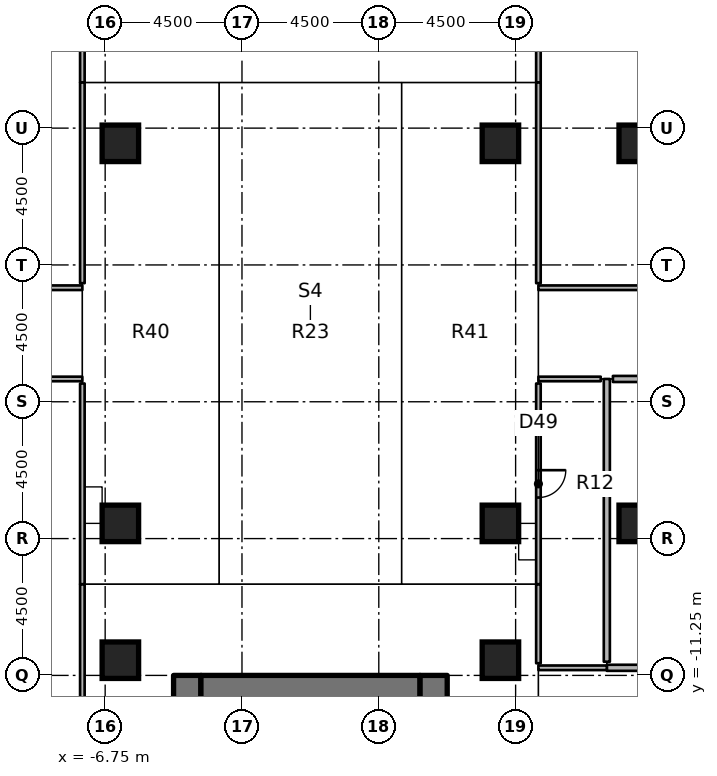
"""IFC4 building model, lengths in metres.
Left out: names, types, materials, properties, quantities, classifications, styles, units other than length and angle.
Written with IfcOpenShell. Run it as: python <this file> out.ifc"""

import sys

from ifc_helpers import new_model, si_unit, direction, frame, frame_2d, origin, origin_2d, place, context, subcontext, project, spatial, rectangle, extrude, element, fill, save


model = new_model("IFC4")
c1 = context("Model", 3, precision=1e-05, world=origin(), true_north=direction((0.0, 1.0)))
c2 = subcontext(c1, "Body", "Model", "MODEL_VIEW")
j1 = project(units=[si_unit("LENGTHUNIT", "METRE"), si_unit("PLANEANGLEUNIT", "RADIAN")], contexts=[c1])
p1 = place(None, origin())
s1 = spatial("IfcSite", under=j1, at=p1, CompositionType="ELEMENT")
p2 = place(p1, origin())
s2 = spatial("IfcBuilding", under=s1, at=p2, CompositionType="ELEMENT")
p3 = place(p2, frame((0.0, 0.0, 7.0)))
s3 = spatial("IfcBuildingStorey", under=s2, at=p3, CompositionType="ELEMENT", Elevation=7.0)
for number, where, z_axis, x_axis in (
    (1, (-6.25, -10.75, 0.0), (0.0, 0.0, 1.0), (1.0, 0.0, 0.0)),
    (2, (-6.25, -6.25, 0.0), (0.0, 0.0, 1.0), (1.0, 0.0, 0.0)),
    (3, (-6.25, 6.25, 0.0), (0.0, 0.0, 1.0), (1.0, 0.0, 0.0)),
    (4, (6.25, -10.75, 0.0), (0.0, 0.0, 1.0), (1.0, 0.0, 0.0)),
    (5, (6.25, -6.25, 0.0), (0.0, 0.0, 1.0), (1.0, 0.0, 0.0)),
    (6, (6.25, 6.25, 0.0), (0.0, 0.0, 1.0), (1.0, 0.0, 0.0)),
    (7, (10.75, -6.25, 0.0), (0.0, 0.0, 1.0), (1.0, 0.0, 0.0)),
    (8, (10.75, 6.25, 0.0), (0.0, 0.0, 1.0), (1.0, 0.0, 0.0)),
):
    element("IfcColumn", number, at=place(p3, frame(where, z_axis=z_axis, x_axis=x_axis)), inside=s3, PredefinedType="COLUMN", context=c2, shape_type="SweptSolid", body=[
        extrude(rectangle(XDim=1.2, YDim=1.2, at=origin_2d()), origin(), (0.0, 0.0, 1.0), 4.55),
    ])
p4 = place(p3, frame((-4.05, -11.25, 0.0), z_axis=(0.0, 0.0, 1.0), x_axis=(0.0, -1.0, 0.0)))
e9 = element("IfcWall", 9, at=p4, inside=s3, PredefinedType="SHEAR", context=c2, shape_type="SweptSolid", body=[
    extrude(rectangle(XDim=15.0, YDim=0.9, at=frame_2d((7.5, 0.0))), origin(), (0.0, 0.0, 1.0), 5.0),
])
p5 = place(p4, frame((7.15, 0.0, 0.0)))
e10 = element("IfcOpeningElement", 10, at=p5, cuts=e9, PredefinedType="OPENING", context=c2, shape_type="SweptSolid", body=[
    extrude(rectangle(XDim=1.5, YDim=2.3, at=frame_2d((0.75, 1.15))), frame((0.0, 0.46, 0.0), z_axis=(0.0, -1.0, 0.0), x_axis=(1.0, 0.0, 0.0)), (0.0, 0.0, 1.0), 0.92),
])
p6 = place(p4, frame((5.55, 0.0, 0.0)))
e11 = element("IfcOpeningElement", 11, at=p6, cuts=e9, PredefinedType="OPENING", context=c2, shape_type="SweptSolid", body=[
    extrude(rectangle(XDim=1.2, YDim=2.1, at=frame_2d((0.6, 1.05))), frame((0.0, 0.46, 0.0), z_axis=(0.0, -1.0, 0.0), x_axis=(1.0, 0.0, 0.0)), (0.0, 0.0, 1.0), 0.92),
])
p7 = place(p3, frame((4.05, -11.25, 0.0), z_axis=(0.0, 0.0, 1.0), x_axis=(0.0, -1.0, 0.0)))
e12 = element("IfcWall", 12, at=p7, inside=s3, PredefinedType="SHEAR", context=c2, shape_type="SweptSolid", body=[
    extrude(rectangle(XDim=15.0, YDim=0.9, at=frame_2d((7.5, 0.0))), origin(), (0.0, 0.0, 1.0), 5.0),
])
p8 = place(p7, frame((7.15, 0.0, 0.0)))
e13 = element("IfcOpeningElement", 13, at=p8, cuts=e12, PredefinedType="OPENING", context=c2, shape_type="SweptSolid", body=[
    extrude(rectangle(XDim=1.5, YDim=2.3, at=frame_2d((0.75, 1.15))), frame((0.0, 0.46, 0.0), z_axis=(0.0, -1.0, 0.0), x_axis=(1.0, 0.0, 0.0)), (0.0, 0.0, 1.0), 0.92),
])
p9 = place(p7, frame((13.9, 0.0, 0.0)))
e14 = element("IfcOpeningElement", 14, at=p9, cuts=e12, PredefinedType="OPENING", context=c2, shape_type="SweptSolid", body=[
    extrude(rectangle(XDim=0.9, YDim=2.1, at=frame_2d((0.45, 1.05))), frame((0.0, 0.46, 0.0), z_axis=(0.0, -1.0, 0.0), x_axis=(1.0, 0.0, 0.0)), (0.0, 0.0, 1.0), 0.92),
])
p10 = place(p7, frame((1.15, 0.0, 0.0)))
e15 = element("IfcOpeningElement", 15, at=p10, cuts=e12, PredefinedType="OPENING", context=c2, shape_type="SweptSolid", body=[
    extrude(rectangle(XDim=1.2, YDim=2.1, at=frame_2d((0.6, 1.05))), frame((0.0, 0.46, 0.0), z_axis=(0.0, -1.0, 0.0), x_axis=(1.0, 0.0, 0.0)), (0.0, 0.0, 1.0), 0.92),
])
p11 = place(p3, frame((-3.6, -11.7, 0.0), z_axis=(0.0, 0.0, 1.0), x_axis=(1.0, 0.0, 0.0)))
e16 = element("IfcWall", 16, at=p11, inside=s3, PredefinedType="SHEAR", context=c2, shape_type="SweptSolid", body=[
    extrude(rectangle(XDim=7.2, YDim=0.9, at=frame_2d((3.6, 0.0))), origin(), (0.0, 0.0, 1.0), 5.0),
])
p12 = place(p3, frame((9.75, -11.0, 0.0), z_axis=(0.0, 0.0, 1.0), x_axis=(1.0, 0.0, 0.0)))
e17 = element("IfcWall", 17, at=p12, inside=s3, PredefinedType="PARTITIONING", context=c2, shape_type="SweptSolid", body=[
    extrude(rectangle(XDim=4.8, YDim=0.2, at=frame_2d((2.4, 0.0))), origin(), (0.0, 0.0, 1.0), 4.55),
])
p13 = place(p3, frame((7.5, -11.0, 0.0), z_axis=(0.0, 0.0, 1.0), x_axis=(1.0, 0.0, 0.0)))
e18 = element("IfcWall", 18, at=p13, inside=s3, PredefinedType="PARTITIONING", context=c2, shape_type="SweptSolid", body=[
    extrude(rectangle(XDim=2.25, YDim=0.15, at=frame_2d((1.125, 0.0))), origin(), (0.0, 0.0, 1.0), 4.55),
])
p14 = place(p3, frame((9.75, -10.8, 0.0), z_axis=(0.0, 0.0, 1.0), x_axis=(0.0, 1.0, 0.0)))
e19 = element("IfcWall", 19, at=p14, inside=s3, PredefinedType="PARTITIONING", context=c2, shape_type="SweptSolid", body=[
    extrude(rectangle(XDim=9.3, YDim=0.2, at=frame_2d((4.65, 0.0))), origin(), (0.0, 0.0, 1.0), 4.55),
])
p15 = place(p3, frame((33.75, -1.5, 0.0), z_axis=(0.0, 0.0, 1.0), x_axis=(-1.0, 0.0, 0.0)))
e20 = element("IfcWall", 20, at=p15, inside=s3, PredefinedType="PARTITIONING", context=c2, shape_type="SweptSolid", body=[
    extrude(rectangle(XDim=23.8, YDim=0.2, at=frame_2d((11.9, 0.0))), origin(), (0.0, 0.0, 1.0), 4.55),
])
p16 = place(p15, frame((11.45, 0.0, 0.0)))
e21 = element("IfcOpeningElement", 21, at=p16, cuts=e20, PredefinedType="OPENING", context=c2, shape_type="SweptSolid", body=[
    extrude(rectangle(XDim=0.9, YDim=2.1, at=frame_2d((0.45, 1.05))), frame((0.0, 0.11, 0.0), z_axis=(0.0, -1.0, 0.0), x_axis=(1.0, 0.0, 0.0)), (0.0, 0.0, 1.0), 0.22),
])
p17 = place(p3, frame((7.5, -10.85, 0.0), z_axis=(0.0, 0.0, 1.0), x_axis=(0.0, 1.0, 0.0)))
e22 = element("IfcWall", 22, at=p17, inside=s3, PredefinedType="PARTITIONING", context=c2, shape_type="SweptSolid", body=[
    extrude(rectangle(XDim=2.6, YDim=0.15, at=frame_2d((1.3, 0.0))), origin(), (0.0, 0.0, 1.0), 4.55),
])
p18 = place(p3, frame((7.5, -1.5, 0.0), z_axis=(0.0, 0.0, 1.0), x_axis=(1.0, 0.0, 0.0)))
e23 = element("IfcWall", 23, at=p18, inside=s3, PredefinedType="PARTITIONING", context=c2, shape_type="SweptSolid", body=[
    extrude(rectangle(XDim=2.05, YDim=0.15, at=frame_2d((1.025, 0.0))), origin(), (0.0, 0.0, 1.0), 4.55),
])
p19 = place(p3, frame((7.5, -1.65, 0.0), z_axis=(0.0, 0.0, 1.0), x_axis=(0.0, -1.0, 0.0)))
e24 = element("IfcWall", 24, at=p19, inside=s3, PredefinedType="PARTITIONING", context=c2, shape_type="SweptSolid", body=[
    extrude(rectangle(XDim=6.6, YDim=0.15, at=frame_2d((3.3, 0.0))), origin(), (0.0, 0.0, 1.0), 4.55),
])
p20 = place(p19, frame((2.85, 0.0, 0.0)))
e25 = element("IfcOpeningElement", 25, at=p20, cuts=e24, PredefinedType="OPENING", context=c2, shape_type="SweptSolid", body=[
    extrude(rectangle(XDim=0.9, YDim=2.1, at=frame_2d((0.45, 1.05))), frame((0.0, 0.085, 0.0), z_axis=(0.0, -1.0, 0.0), x_axis=(1.0, 0.0, 0.0)), (0.0, 0.0, 1.0), 0.17),
])
p21 = place(p3, frame((7.5, 30.0, 0.0), z_axis=(0.0, 0.0, 1.0), x_axis=(0.0, -1.0, 0.0)))
e26 = element("IfcWall", 26, at=p21, inside=s3, PredefinedType="PARTITIONING", context=c2, shape_type="SweptSolid", body=[
    extrude(rectangle(XDim=21.75, YDim=0.15, at=frame_2d((10.875, 0.0))), origin(), (0.0, 0.0, 1.0), 4.55),
])
p22 = place(p21, frame((6.75, 0.0, 0.0)))
e27 = element("IfcOpeningElement", 27, at=p22, cuts=e26, PredefinedType="OPENING", context=c2, shape_type="SweptSolid", body=[
    extrude(rectangle(XDim=1.0, YDim=2.1, at=frame_2d((0.5, 1.05))), frame((0.0, 0.085, 0.0), z_axis=(0.0, -1.0, 0.0), x_axis=(1.0, 0.0, 0.0)), (0.0, 0.0, 1.0), 0.17),
])
p23 = place(p3, frame((-7.5, 8.25, 0.0), z_axis=(0.0, 0.0, 1.0), x_axis=(0.0, 1.0, 0.0)))
e28 = element("IfcWall", 28, at=p23, inside=s3, PredefinedType="PARTITIONING", context=c2, shape_type="SweptSolid", body=[
    extrude(rectangle(XDim=21.75, YDim=0.15, at=frame_2d((10.875, 0.0))), origin(), (0.0, 0.0, 1.0), 4.55),
])
p24 = place(p23, frame((5.75, 0.0, 0.0)))
e29 = element("IfcOpeningElement", 29, at=p24, cuts=e28, PredefinedType="OPENING", context=c2, shape_type="SweptSolid", body=[
    extrude(rectangle(XDim=1.0, YDim=2.1, at=frame_2d((0.5, 1.05))), frame((0.0, 0.085, 0.0), z_axis=(0.0, -1.0, 0.0), x_axis=(1.0, 0.0, 0.0)), (0.0, 0.0, 1.0), 0.17),
])
p25 = place(p3, frame((-7.5, -32.25, 0.0), z_axis=(0.0, 0.0, 1.0), x_axis=(0.0, 1.0, 0.0)))
e30 = element("IfcWall", 30, at=p25, inside=s3, PredefinedType="PARTITIONING", context=c2, shape_type="SweptSolid", body=[
    extrude(rectangle(XDim=24.0, YDim=0.15, at=frame_2d((12.0, 0.0))), origin(), (0.0, 0.0, 1.0), 4.55),
])
p26 = place(p25, frame((12.75, 0.0, 0.0)))
e31 = element("IfcOpeningElement", 31, at=p26, cuts=e30, PredefinedType="OPENING", context=c2, shape_type="SweptSolid", body=[
    extrude(rectangle(XDim=0.9, YDim=2.1, at=frame_2d((0.45, 1.05))), frame((0.0, 0.085, 0.0), z_axis=(0.0, -1.0, 0.0), x_axis=(1.0, 0.0, 0.0)), (0.0, 0.0, 1.0), 0.17),
])
p27 = place(p3, frame((7.5, 1.5, 0.0), z_axis=(0.0, 0.0, 1.0), x_axis=(1.0, 0.0, 0.0)))
e32 = element("IfcWall", 32, at=p27, inside=s3, PredefinedType="PARTITIONING", context=c2, shape_type="SweptSolid", body=[
    extrude(rectangle(XDim=21.75, YDim=0.15, at=frame_2d((10.875, 0.0))), origin(), (0.0, 0.0, 1.0), 4.55),
])
p28 = place(p27, frame((14.0, 0.0, 0.0)))
e33 = element("IfcOpeningElement", 33, at=p28, cuts=e32, PredefinedType="OPENING", context=c2, shape_type="SweptSolid", body=[
    extrude(rectangle(XDim=1.0, YDim=2.1, at=frame_2d((0.5, 1.05))), frame((0.0, 0.085, 0.0), z_axis=(0.0, -1.0, 0.0), x_axis=(1.0, 0.0, 0.0)), (0.0, 0.0, 1.0), 0.17),
])
p29 = place(p3, frame((-24.75, 1.5, 0.0), z_axis=(0.0, 0.0, 1.0), x_axis=(1.0, 0.0, 0.0)))
e34 = element("IfcWall", 34, at=p29, inside=s3, PredefinedType="PARTITIONING", context=c2, shape_type="SweptSolid", body=[
    extrude(rectangle(XDim=17.25, YDim=0.15, at=frame_2d((8.625, 0.0))), origin(), (0.0, 0.0, 1.0), 4.55),
])
p30 = place(p29, frame((11.0, 0.0, 0.0)))
e35 = element("IfcOpeningElement", 35, at=p30, cuts=e34, PredefinedType="OPENING", context=c2, shape_type="SweptSolid", body=[
    extrude(rectangle(XDim=1.0, YDim=2.1, at=frame_2d((0.5, 1.05))), frame((0.0, 0.085, 0.0), z_axis=(0.0, -1.0, 0.0), x_axis=(1.0, 0.0, 0.0)), (0.0, 0.0, 1.0), 0.17),
])
p31 = place(p3, frame((-7.5, -1.5, 0.0), z_axis=(0.0, 0.0, 1.0), x_axis=(-1.0, 0.0, 0.0)))
e36 = element("IfcWall", 36, at=p31, inside=s3, PredefinedType="PARTITIONING", context=c2, shape_type="SweptSolid", body=[
    extrude(rectangle(XDim=19.5, YDim=0.15, at=frame_2d((9.75, 0.0))), origin(), (0.0, 0.0, 1.0), 4.55),
])
for number, where, z_axis, x_axis in (
    (37, (7.5, 1.65, 0.0), (0.0, 0.0, 1.0), (0.0, 1.0, 0.0)),
    (38, (-7.5, 8.25, 0.0), (0.0, 0.0, 1.0), (0.0, -1.0, 0.0)),
    (39, (-7.5, -1.65, 0.0), (0.0, 0.0, 1.0), (0.0, -1.0, 0.0)),
):
    element("IfcWall", number, at=place(p3, frame(where, z_axis=z_axis, x_axis=x_axis)), inside=s3, PredefinedType="PARTITIONING", context=c2, shape_type="SweptSolid", body=[
        extrude(rectangle(XDim=6.6, YDim=0.15, at=frame_2d((3.3, 0.0))), origin(), (0.0, 0.0, 1.0), 4.55),
    ])
p32 = place(p20, origin())
e40 = element("IfcDoor", 40, at=p32, inside=s3, OperationType="SINGLE_SWING_LEFT", PredefinedType="DOOR", context=c2, shape_type="SweptSolid", body=[
    extrude(rectangle(XDim=0.9, YDim=2.1, at=frame_2d((0.45, 1.05))), frame((0.0, 0.025, 0.0), z_axis=(0.0, -1.0, 0.0), x_axis=(1.0, 0.0, 0.0)), (0.0, 0.0, 1.0), 0.05),
])
fill(e25, e40)
save(model, sys.argv[1])
